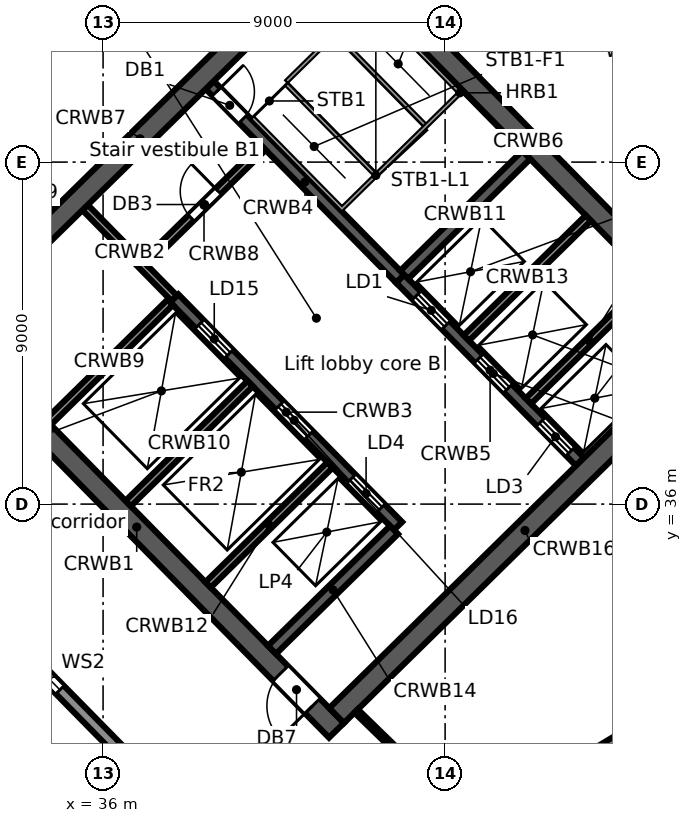
"""IFC4 building model, lengths in metres.
Left out: names, types, materials, properties, quantities, classifications, styles, units other than length and angle.
Written with IfcOpenShell. Run it as: python <this file> out.ifc"""

import sys

from ifc_helpers import new_model, si_unit, direction, frame, frame_2d, origin, place, context, subcontext, project, spatial, rectangle, extrude, element, fill, save


model = new_model("IFC4")
c1 = context("Model", 3, precision=1e-05, world=origin(), true_north=direction((0.0, 1.0)))
c2 = subcontext(c1, "Body", "Model", "MODEL_VIEW")
j1 = project(units=[si_unit("LENGTHUNIT", "METRE"), si_unit("PLANEANGLEUNIT", "RADIAN")], contexts=[c1])
p1 = place(None, origin())
s1 = spatial("IfcSite", under=j1, at=p1, CompositionType="ELEMENT")
p2 = place(p1, origin())
s2 = spatial("IfcBuilding", under=s1, at=p2, CompositionType="ELEMENT")
p3 = place(p2, frame((0.0, 0.0, 123.5)))
s3 = spatial("IfcBuildingStorey", under=s2, at=p3, CompositionType="ELEMENT", Elevation=123.5)
p4 = place(p3, frame((38.727, 27.181, 0.0), z_axis=(0.0, 0.0, 1.0), x_axis=(-0.700906405975, 0.713253258011, 0.0)))
e1 = element("IfcWall", 1, at=p4, inside=s3, PredefinedType="STANDARD", context=c2, shape_type="SweptSolid", body=[
    extrude(rectangle(XDim=18.923, YDim=0.3, at=frame_2d((9.462, 0.0))), origin(), (0.0, 0.0, 1.0), 4.08),
])
p5 = place(p4, frame((14.967, 0.0, 0.6)))
e2 = element("IfcOpeningElement", 2, at=p5, cuts=e1, PredefinedType="OPENING", context=c2, shape_type="SweptSolid", body=[
    extrude(rectangle(XDim=0.9, YDim=2.8, at=frame_2d((0.45, 1.4))), frame((0.0, 0.16, 0.0), z_axis=(0.0, -1.0, 0.0), x_axis=(1.0, 0.0, 0.0)), (0.0, 0.0, 1.0), 0.32),
])
p6 = place(p4, frame((5.512, 0.0, 0.6)))
e3 = element("IfcOpeningElement", 3, at=p6, cuts=e1, PredefinedType="OPENING", context=c2, shape_type="SweptSolid", body=[
    extrude(rectangle(XDim=0.9, YDim=2.8, at=frame_2d((0.45, 1.4))), frame((0.0, 0.16, 0.0), z_axis=(0.0, -1.0, 0.0), x_axis=(1.0, 0.0, 0.0)), (0.0, 0.0, 1.0), 0.32),
])
p7 = place(p3, frame((58.778, 35.318, 0.0), z_axis=(0.0, 0.0, 1.0), x_axis=(-0.857168206138, -0.515036568009, 0.0)))
e4 = element("IfcWall", 4, at=p7, inside=s3, PredefinedType="STANDARD", context=c2, shape_type="SweptSolid", body=[
    extrude(rectangle(XDim=17.125, YDim=0.3, at=frame_2d((8.562, 0.0))), origin(), (0.0, 0.0, 1.0), 4.08),
])
p8 = place(p7, frame((13.435, 0.0, 0.6)))
e5 = element("IfcOpeningElement", 5, at=p8, cuts=e4, PredefinedType="OPENING", context=c2, shape_type="SweptSolid", body=[
    extrude(rectangle(XDim=0.9, YDim=2.8, at=frame_2d((0.45, 1.4))), frame((0.0, 0.16, 0.0), z_axis=(0.0, -1.0, 0.0), x_axis=(1.0, 0.0, 0.0)), (0.0, 0.0, 1.0), 0.32),
])
p9 = place(p7, frame((4.935, 0.0, 0.6)))
e6 = element("IfcOpeningElement", 6, at=p9, cuts=e4, PredefinedType="OPENING", context=c2, shape_type="SweptSolid", body=[
    extrude(rectangle(XDim=0.9, YDim=2.8, at=frame_2d((0.45, 1.4))), frame((0.0, 0.16, 0.0), z_axis=(0.0, -1.0, 0.0), x_axis=(1.0, 0.0, 0.0)), (0.0, 0.0, 1.0), 0.32),
])
p10 = place(p3, frame((40.594, 58.577, 0.0), z_axis=(0.0, 0.0, 1.0), x_axis=(0.700909719808, -0.713250001528, 0.0)))
e7 = element("IfcWall", 7, at=p10, inside=s3, PredefinedType="STANDARD", context=c2, shape_type="SweptSolid", body=[
    extrude(rectangle(XDim=26.708, YDim=0.3, at=frame_2d((13.354, 0.0))), origin(), (0.0, 0.0, 1.0), 4.08),
])
p11 = place(p10, frame((22.858, 0.0, 0.6)))
e8 = element("IfcOpeningElement", 8, at=p11, cuts=e7, PredefinedType="OPENING", context=c2, shape_type="SweptSolid", body=[
    extrude(rectangle(XDim=0.9, YDim=2.8, at=frame_2d((0.45, 1.4))), frame((0.0, 0.16, 0.0), z_axis=(0.0, -1.0, 0.0), x_axis=(1.0, 0.0, 0.0)), (0.0, 0.0, 1.0), 0.32),
])
p12 = place(p10, frame((13.987, 0.0, 0.6)))
e9 = element("IfcOpeningElement", 9, at=p12, cuts=e7, PredefinedType="OPENING", context=c2, shape_type="SweptSolid", body=[
    extrude(rectangle(XDim=0.9, YDim=2.8, at=frame_2d((0.45, 1.4))), frame((0.0, 0.16, 0.0), z_axis=(0.0, -1.0, 0.0), x_axis=(1.0, 0.0, 0.0)), (0.0, 0.0, 1.0), 0.32),
])
p13 = place(p10, frame((5.115, 0.0, 0.6)))
e10 = element("IfcOpeningElement", 10, at=p13, cuts=e7, PredefinedType="OPENING", context=c2, shape_type="SweptSolid", body=[
    extrude(rectangle(XDim=0.9, YDim=2.8, at=frame_2d((0.45, 1.4))), frame((0.0, 0.16, 0.0), z_axis=(0.0, -1.0, 0.0), x_axis=(1.0, 0.0, 0.0)), (0.0, 0.0, 1.0), 0.32),
])
p14 = place(p3, frame((31.628, 40.745, 0.0), z_axis=(0.0, 0.0, 1.0), x_axis=(0.700911255944, -0.713248491965, 0.0)))
e11 = element("IfcWall", 11, at=p14, inside=s3, PredefinedType="SOLIDWALL", context=c2, shape_type="SweptSolid", body=[
    extrude(rectangle(XDim=15.0, YDim=0.55, at=frame_2d((7.5, 0.0))), origin(), (0.0, 0.0, 1.0), 4.08),
])
p15 = place(p14, frame((12.9, 0.0, 0.0)))
e12 = element("IfcOpeningElement", 12, at=p15, cuts=e11, PredefinedType="OPENING", context=c2, shape_type="SweptSolid", body=[
    extrude(rectangle(XDim=1.2, YDim=2.1, at=frame_2d((0.6, 1.05))), frame((0.0, 0.285, 0.0), z_axis=(0.0, -1.0, 0.0), x_axis=(1.0, 0.0, 0.0)), (0.0, 0.0, 1.0), 0.57),
])
p16 = place(p3, frame((35.526, 43.805, 0.0), z_axis=(0.0, 0.0, 1.0), x_axis=(0.700884863746, -0.713274426691, 0.0)))
e13 = element("IfcWall", 13, at=p16, inside=s3, PredefinedType="SOLIDWALL", context=c2, shape_type="SweptSolid", body=[
    extrude(rectangle(XDim=3.35, YDim=0.2, at=frame_2d((1.675, 0.0))), origin(), (0.0, 0.0, 1.0), 4.08),
])
p17 = place(p3, frame((37.874, 41.416, 0.0), z_axis=(0.0, 0.0, 1.0), x_axis=(0.700918271237, -0.71324159795, 0.0)))
e14 = element("IfcWall", 14, at=p17, inside=s3, PredefinedType="SOLIDWALL", context=c2, shape_type="SweptSolid", body=[
    extrude(rectangle(XDim=8.4, YDim=0.3, at=frame_2d((4.2, 0.0))), origin(), (0.0, 0.0, 1.0), 4.08),
])
p18 = place(p17, frame((0.95, 0.0, 0.0)))
e15 = element("IfcOpeningElement", 15, at=p18, cuts=e14, PredefinedType="OPENING", context=c2, shape_type="SweptSolid", body=[
    extrude(rectangle(XDim=1.1, YDim=2.1, at=frame_2d((0.55, 1.05))), frame((0.0, 0.16, 0.0), z_axis=(0.0, -1.0, 0.0), x_axis=(1.0, 0.0, 0.0)), (0.0, 0.0, 1.0), 0.32),
])
p19 = place(p17, frame((3.95, 0.0, 0.0)))
e16 = element("IfcOpeningElement", 16, at=p19, cuts=e14, PredefinedType="OPENING", context=c2, shape_type="SweptSolid", body=[
    extrude(rectangle(XDim=1.1, YDim=2.1, at=frame_2d((0.55, 1.05))), frame((0.0, 0.16, 0.0), z_axis=(0.0, -1.0, 0.0), x_axis=(1.0, 0.0, 0.0)), (0.0, 0.0, 1.0), 0.32),
])
p20 = place(p17, frame((6.65, 0.0, 0.0)))
e17 = element("IfcOpeningElement", 17, at=p20, cuts=e14, PredefinedType="OPENING", context=c2, shape_type="SweptSolid", body=[
    extrude(rectangle(XDim=1.1, YDim=2.1, at=frame_2d((0.55, 1.05))), frame((0.0, 0.16, 0.0), z_axis=(0.0, -1.0, 0.0), x_axis=(1.0, 0.0, 0.0)), (0.0, 0.0, 1.0), 0.32),
])
p21 = place(p3, frame((38.807, 47.029, 0.0), z_axis=(0.0, 0.0, 1.0), x_axis=(0.700916852778, -0.713242991898, 0.0)))
e18 = element("IfcWall", 18, at=p21, inside=s3, PredefinedType="SOLIDWALL", context=c2, shape_type="SweptSolid", body=[
    extrude(rectangle(XDim=7.15, YDim=0.3, at=frame_2d((3.575, 0.0))), origin(), (0.0, 0.0, 1.0), 4.08),
])
p22 = place(p21, frame((0.25, 0.0, 0.0)))
e19 = element("IfcOpeningElement", 19, at=p22, cuts=e18, PredefinedType="OPENING", context=c2, shape_type="SweptSolid", body=[
    extrude(rectangle(XDim=1.0, YDim=2.1, at=frame_2d((0.5, 1.05))), frame((0.0, 0.16, 0.0), z_axis=(0.0, -1.0, 0.0), x_axis=(1.0, 0.0, 0.0)), (0.0, 0.0, 1.0), 0.32),
])
p23 = place(p3, frame((43.819, 41.929, 0.0), z_axis=(0.0, 0.0, 1.0), x_axis=(0.700931209592, -0.713228882912, 0.0)))
e20 = element("IfcWall", 20, at=p23, inside=s3, PredefinedType="SOLIDWALL", context=c2, shape_type="SweptSolid", body=[
    extrude(rectangle(XDim=6.75, YDim=0.3, at=frame_2d((3.375, 0.0))), origin(), (0.0, 0.0, 1.0), 4.08),
])
p24 = place(p23, frame((0.615, 0.0, 0.0)))
e21 = element("IfcOpeningElement", 21, at=p24, cuts=e20, PredefinedType="OPENING", context=c2, shape_type="SweptSolid", body=[
    extrude(rectangle(XDim=1.1, YDim=2.1, at=frame_2d((0.55, 1.05))), frame((0.0, 0.16, 0.0), z_axis=(0.0, -1.0, 0.0), x_axis=(1.0, 0.0, 0.0)), (0.0, 0.0, 1.0), 0.32),
])
p25 = place(p23, frame((2.945, 0.0, 0.0)))
e22 = element("IfcOpeningElement", 22, at=p25, cuts=e20, PredefinedType="OPENING", context=c2, shape_type="SweptSolid", body=[
    extrude(rectangle(XDim=1.1, YDim=2.1, at=frame_2d((0.55, 1.05))), frame((0.0, 0.16, 0.0), z_axis=(0.0, -1.0, 0.0), x_axis=(1.0, 0.0, 0.0)), (0.0, 0.0, 1.0), 0.32),
])
p26 = place(p23, frame((5.28, 0.0, 0.0)))
e23 = element("IfcOpeningElement", 23, at=p26, cuts=e20, PredefinedType="OPENING", context=c2, shape_type="SweptSolid", body=[
    extrude(rectangle(XDim=1.1, YDim=2.1, at=frame_2d((0.55, 1.05))), frame((0.0, 0.16, 0.0), z_axis=(0.0, -1.0, 0.0), x_axis=(1.0, 0.0, 0.0)), (0.0, 0.0, 1.0), 0.32),
])
p27 = place(p3, frame((41.934, 50.873, 0.0), z_axis=(0.0, 0.0, 1.0), x_axis=(0.700911255944, -0.713248491965, 0.0)))
e24 = element("IfcWall", 24, at=p27, inside=s3, PredefinedType="SOLIDWALL", context=c2, shape_type="SweptSolid", body=[
    extrude(rectangle(XDim=15.0, YDim=0.55, at=frame_2d((7.5, 0.0))), origin(), (0.0, 0.0, 1.0), 4.08),
])
p28 = place(p3, frame((32.017, 40.742, 0.0), z_axis=(0.0, 0.0, 1.0), x_axis=(0.713253550094, 0.700906108746, 0.0)))
e25 = element("IfcWall", 25, at=p28, inside=s3, PredefinedType="SOLIDWALL", context=c2, shape_type="SweptSolid", body=[
    extrude(rectangle(XDim=13.9, YDim=0.55, at=frame_2d((6.95, 0.0))), origin(), (0.0, 0.0, 1.0), 4.08),
])
p29 = place(p3, frame((37.104, 42.342, 0.0), z_axis=(0.0, 0.0, 1.0), x_axis=(0.713281298468, 0.700877870428, 0.0)))
e26 = element("IfcWall", 26, at=p29, inside=s3, PredefinedType="PARTITIONING", context=c2, shape_type="SweptSolid", body=[
    extrude(rectangle(XDim=4.35, YDim=0.2, at=frame_2d((2.175, 0.0))), origin(), (0.0, 0.0, 1.0), 4.08),
])
p30 = place(p29, frame((1.7, 0.0, 0.0)))
e27 = element("IfcOpeningElement", 27, at=p30, cuts=e26, PredefinedType="OPENING", context=c2, shape_type="SweptSolid", body=[
    extrude(rectangle(XDim=1.0, YDim=2.1, at=frame_2d((0.5, 1.05))), frame((0.0, 0.11, 0.0), z_axis=(0.0, -1.0, 0.0), x_axis=(1.0, 0.0, 0.0)), (0.0, 0.0, 1.0), 0.22),
])
p31 = place(p3, frame((34.558, 38.156, 0.0), z_axis=(0.0, 0.0, 1.0), x_axis=(0.713237924006, 0.700922009755, 0.0)))
e28 = element("IfcWall", 28, at=p31, inside=s3, PredefinedType="SOLIDWALL", context=c2, shape_type="SweptSolid", body=[
    extrude(rectangle(XDim=4.5, YDim=0.2, at=frame_2d((2.25, 0.0))), origin(), (0.0, 0.0, 1.0), 4.08),
])
p32 = place(p3, frame((36.66, 36.017, 0.0), z_axis=(0.0, 0.0, 1.0), x_axis=(0.713264577552, 0.700894886848, 0.0)))
e29 = element("IfcWall", 29, at=p32, inside=s3, PredefinedType="SOLIDWALL", context=c2, shape_type="SweptSolid", body=[
    extrude(rectangle(XDim=4.5, YDim=0.2, at=frame_2d((2.25, 0.0))), origin(), (0.0, 0.0, 1.0), 4.08),
])
p33 = place(p3, frame((43.926, 42.034, 0.0), z_axis=(0.0, 0.0, 1.0), x_axis=(0.713210801054, 0.700949608217, 0.0)))
e30 = element("IfcWall", 30, at=p33, inside=s3, PredefinedType="SOLIDWALL", context=c2, shape_type="SweptSolid", body=[
    extrude(rectangle(XDim=4.5, YDim=0.3, at=frame_2d((2.25, 0.0))), origin(), (0.0, 0.0, 1.0), 4.08),
])
p34 = place(p3, frame((38.763, 33.877, 0.0), z_axis=(0.0, 0.0, 1.0), x_axis=(0.713237455685, 0.700922486305, 0.0)))
e31 = element("IfcWall", 31, at=p34, inside=s3, PredefinedType="SOLIDWALL", context=c2, shape_type="SweptSolid", body=[
    extrude(rectangle(XDim=4.5, YDim=0.2, at=frame_2d((2.25, 0.0))), origin(), (0.0, 0.0, 1.0), 4.08),
])
p35 = place(p3, frame((45.559, 40.373, 0.0), z_axis=(0.0, 0.0, 1.0), x_axis=(0.713264577552, 0.700894886848, 0.0)))
e32 = element("IfcWall", 32, at=p35, inside=s3, PredefinedType="SOLIDWALL", context=c2, shape_type="SweptSolid", body=[
    extrude(rectangle(XDim=4.5, YDim=0.2, at=frame_2d((2.25, 0.0))), origin(), (0.0, 0.0, 1.0), 4.08),
])
p36 = place(p3, frame((40.445, 32.165, 0.0), z_axis=(0.0, 0.0, 1.0), x_axis=(0.713264577552, 0.700894886848, 0.0)))
e33 = element("IfcWall", 33, at=p36, inside=s3, PredefinedType="SOLIDWALL", context=c2, shape_type="SweptSolid", body=[
    extrude(rectangle(XDim=4.5, YDim=0.3, at=frame_2d((2.25, 0.0))), origin(), (0.0, 0.0, 1.0), 4.08),
])
p37 = place(p3, frame((47.192, 38.711, 0.0), z_axis=(0.0, 0.0, 1.0), x_axis=(0.713264577552, 0.700894886848, 0.0)))
e34 = element("IfcWall", 34, at=p37, inside=s3, PredefinedType="SOLIDWALL", context=c2, shape_type="SweptSolid", body=[
    extrude(rectangle(XDim=4.5, YDim=0.2, at=frame_2d((2.25, 0.0))), origin(), (0.0, 0.0, 1.0), 4.08),
])
p38 = place(p3, frame((42.145, 30.435, 0.0), z_axis=(0.0, 0.0, 1.0), x_axis=(0.713253550094, 0.700906108746, 0.0)))
e35 = element("IfcWall", 35, at=p38, inside=s3, PredefinedType="SOLIDWALL", context=c2, shape_type="SweptSolid", body=[
    extrude(rectangle(XDim=13.9, YDim=0.55, at=frame_2d((6.95, 0.0))), origin(), (0.0, 0.0, 1.0), 4.08),
])
p39 = place(p3, frame((42.659, 30.555, 0.0), z_axis=(0.0, 0.0, 1.0), x_axis=(0.716925671772, -0.697149611743, 0.0)))
e36 = element("IfcWall", 36, at=p39, inside=s3, PredefinedType="PARTITIONING", context=c2, shape_type="SweptSolid", body=[
    extrude(rectangle(XDim=4.21, YDim=0.125, at=frame_2d((2.105, 0.0))), origin(), (0.0, 0.0, 1.0), 3.352),
])
p40 = place(p6, origin())
e37 = element("IfcWindow", 37, at=p40, inside=s3, PartitioningType="SINGLE_PANEL", PredefinedType="WINDOW", context=c2, shape_type="SweptSolid", body=[
    extrude(rectangle(XDim=0.9, YDim=2.8, at=frame_2d((0.45, 1.4))), frame((0.0, 0.03, 0.0), z_axis=(0.0, -1.0, 0.0), x_axis=(1.0, 0.0, 0.0)), (0.0, 0.0, 1.0), 0.06),
])
fill(e3, e37)
p41 = place(p24, origin())
e38 = element("IfcDoor", 38, at=p41, inside=s3, OperationType="DOUBLE_DOOR_SLIDING", PredefinedType="DOOR", context=c2, shape_type="SweptSolid", body=[
    extrude(rectangle(XDim=1.1, YDim=2.1, at=frame_2d((0.55, 1.05))), frame((0.0, 0.025, 0.0), z_axis=(0.0, -1.0, 0.0), x_axis=(1.0, 0.0, 0.0)), (0.0, 0.0, 1.0), 0.05),
])
fill(e21, e38)
p42 = place(p25, origin())
e39 = element("IfcDoor", 39, at=p42, inside=s3, OperationType="DOUBLE_DOOR_SLIDING", PredefinedType="DOOR", context=c2, shape_type="SweptSolid", body=[
    extrude(rectangle(XDim=1.1, YDim=2.1, at=frame_2d((0.55, 1.05))), frame((0.0, 0.025, 0.0), z_axis=(0.0, -1.0, 0.0), x_axis=(1.0, 0.0, 0.0)), (0.0, 0.0, 1.0), 0.05),
])
fill(e22, e39)
p43 = place(p26, origin())
e40 = element("IfcDoor", 40, at=p43, inside=s3, OperationType="DOUBLE_DOOR_SLIDING", PredefinedType="DOOR", context=c2, shape_type="SweptSolid", body=[
    extrude(rectangle(XDim=1.1, YDim=2.1, at=frame_2d((0.55, 1.05))), frame((0.0, 0.025, 0.0), z_axis=(0.0, -1.0, 0.0), x_axis=(1.0, 0.0, 0.0)), (0.0, 0.0, 1.0), 0.05),
])
fill(e23, e40)
p44 = place(p18, origin())
e41 = element("IfcDoor", 41, at=p44, inside=s3, OperationType="DOUBLE_DOOR_SLIDING", PredefinedType="DOOR", context=c2, shape_type="SweptSolid", body=[
    extrude(rectangle(XDim=1.1, YDim=2.1, at=frame_2d((0.55, 1.05))), frame((0.0, 0.025, 0.0), z_axis=(0.0, -1.0, 0.0), x_axis=(1.0, 0.0, 0.0)), (0.0, 0.0, 1.0), 0.05),
])
fill(e15, e41)
p45 = place(p19, origin())
e42 = element("IfcDoor", 42, at=p45, inside=s3, OperationType="DOUBLE_DOOR_SLIDING", PredefinedType="DOOR", context=c2, shape_type="SweptSolid", body=[
    extrude(rectangle(XDim=1.1, YDim=2.1, at=frame_2d((0.55, 1.05))), frame((0.0, 0.025, 0.0), z_axis=(0.0, -1.0, 0.0), x_axis=(1.0, 0.0, 0.0)), (0.0, 0.0, 1.0), 0.05),
])
fill(e16, e42)
p46 = place(p20, origin())
e43 = element("IfcDoor", 43, at=p46, inside=s3, OperationType="DOUBLE_DOOR_SLIDING", PredefinedType="DOOR", context=c2, shape_type="SweptSolid", body=[
    extrude(rectangle(XDim=1.1, YDim=2.1, at=frame_2d((0.55, 1.05))), frame((0.0, 0.025, 0.0), z_axis=(0.0, -1.0, 0.0), x_axis=(1.0, 0.0, 0.0)), (0.0, 0.0, 1.0), 0.05),
])
fill(e17, e43)
p47 = place(p22, origin())
e44 = element("IfcDoor", 44, at=p47, inside=s3, OperationType="SINGLE_SWING_LEFT", PredefinedType="DOOR", context=c2, shape_type="SweptSolid", body=[
    extrude(rectangle(XDim=1.0, YDim=2.1, at=frame_2d((0.5, 1.05))), frame((0.0, 0.025, 0.0), z_axis=(0.0, -1.0, 0.0), x_axis=(1.0, 0.0, 0.0)), (0.0, 0.0, 1.0), 0.05),
])
fill(e19, e44)
p48 = place(p30, origin())
e45 = element("IfcDoor", 45, at=p48, inside=s3, OperationType="SINGLE_SWING_RIGHT", PredefinedType="DOOR", context=c2, shape_type="SweptSolid", body=[
    extrude(rectangle(XDim=1.0, YDim=2.1, at=frame_2d((0.5, 1.05))), frame((0.0, 0.025, 0.0), z_axis=(0.0, -1.0, 0.0), x_axis=(1.0, 0.0, 0.0)), (0.0, 0.0, 1.0), 0.05),
])
fill(e27, e45)
p49 = place(p15, frame((1.2, 0.0, 0.0), z_axis=(0.0, 0.0, 1.0), x_axis=(-1.0, 0.0, 0.0)))
e46 = element("IfcDoor", 46, at=p49, inside=s3, OperationType="SINGLE_SWING_LEFT", PredefinedType="DOOR", context=c2, shape_type="SweptSolid", body=[
    extrude(rectangle(XDim=1.2, YDim=2.1, at=frame_2d((0.6, 1.05))), frame((0.0, 0.025, 0.0), z_axis=(0.0, -1.0, 0.0), x_axis=(1.0, 0.0, 0.0)), (0.0, 0.0, 1.0), 0.05),
])
fill(e12, e46)
save(model, sys.argv[1])
